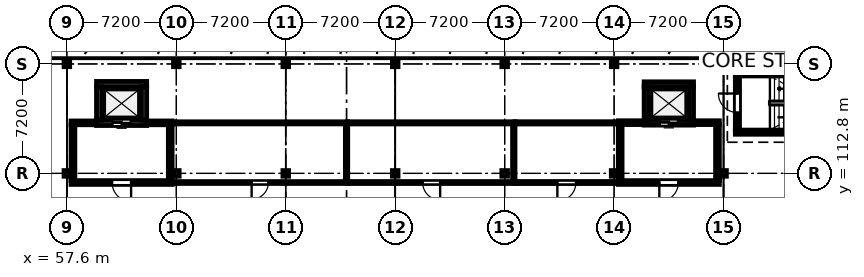
"""IFC4 building model, lengths in metres.
Left out: names, types, materials, properties, quantities, classifications, styles, units other than length and angle.
Written with IfcOpenShell. Run it as: python <this file> out.ifc"""

import sys

from ifc_helpers import new_model, si_unit, direction, frame, frame_2d, origin, origin_2d, place, context, subcontext, project, spatial, rectangle, i_section, extrude, element, fill, save


model = new_model("IFC4")
c1 = context("Model", 3, precision=1e-05, world=origin(), true_north=direction((0.0, 1.0)))
c2 = subcontext(c1, "Body", "Model", "MODEL_VIEW")
j1 = project(units=[si_unit("LENGTHUNIT", "METRE"), si_unit("PLANEANGLEUNIT", "RADIAN")], contexts=[c1])
p1 = place(None, origin())
s1 = spatial("IfcSite", under=j1, at=p1, CompositionType="ELEMENT")
p2 = place(p1, origin())
s2 = spatial("IfcBuilding", under=s1, at=p2, CompositionType="ELEMENT")
p3 = place(p2, frame((0.0, 0.0, 13.2)))
s3 = spatial("IfcBuildingStorey", under=s2, at=p3, CompositionType="ELEMENT", Elevation=13.2)
p4 = place(p3, frame((57.6, 112.8, 0.0), z_axis=(0.0, 0.0, 1.0), x_axis=(1.0, 0.0, 0.0)))
e1 = element("IfcColumn", 1, at=p4, inside=s3, PredefinedType="COLUMN", context=c2, shape_type="SweptSolid", body=[
    extrude(i_section(OverallWidth=0.373, OverallDepth=0.373, WebThickness=0.016, FlangeThickness=0.026, FilletRadius=0.015, at=origin_2d()), origin(), (0.0, 0.0, 1.0), 3.9),
])
p5 = place(p3, frame((57.6, 120.0, 0.0), z_axis=(0.0, 0.0, 1.0), x_axis=(1.0, 0.0, 0.0)))
e2 = element("IfcColumn", 2, at=p5, inside=s3, PredefinedType="COLUMN", context=c2, shape_type="SweptSolid", body=[
    extrude(i_section(OverallWidth=0.371, OverallDepth=0.363, WebThickness=0.013, FlangeThickness=0.022, FilletRadius=0.015, at=origin_2d()), origin(), (0.0, 0.0, 1.0), 3.9),
])
p6 = place(p3, frame((64.8, 112.8, 0.0), z_axis=(0.0, 0.0, 1.0), x_axis=(1.0, 0.0, 0.0)))
e3 = element("IfcColumn", 3, at=p6, inside=s3, PredefinedType="COLUMN", context=c2, shape_type="SweptSolid", body=[
    extrude(i_section(OverallWidth=0.373, OverallDepth=0.373, WebThickness=0.016, FlangeThickness=0.026, FilletRadius=0.015, at=origin_2d()), origin(), (0.0, 0.0, 1.0), 3.9),
])
p7 = place(p3, frame((64.8, 120.0, 0.0), z_axis=(0.0, 0.0, 1.0), x_axis=(1.0, 0.0, 0.0)))
e4 = element("IfcColumn", 4, at=p7, inside=s3, PredefinedType="COLUMN", context=c2, shape_type="SweptSolid", body=[
    extrude(i_section(OverallWidth=0.371, OverallDepth=0.363, WebThickness=0.013, FlangeThickness=0.022, FilletRadius=0.015, at=origin_2d()), origin(), (0.0, 0.0, 1.0), 3.9),
])
p8 = place(p3, frame((72.0, 112.8, 0.0), z_axis=(0.0, 0.0, 1.0), x_axis=(1.0, 0.0, 0.0)))
e5 = element("IfcColumn", 5, at=p8, inside=s3, PredefinedType="COLUMN", context=c2, shape_type="SweptSolid", body=[
    extrude(i_section(OverallWidth=0.373, OverallDepth=0.373, WebThickness=0.016, FlangeThickness=0.026, FilletRadius=0.015, at=origin_2d()), origin(), (0.0, 0.0, 1.0), 3.9),
])
p9 = place(p3, frame((72.0, 120.0, 0.0), z_axis=(0.0, 0.0, 1.0), x_axis=(1.0, 0.0, 0.0)))
e6 = element("IfcColumn", 6, at=p9, inside=s3, PredefinedType="COLUMN", context=c2, shape_type="SweptSolid", body=[
    extrude(i_section(OverallWidth=0.371, OverallDepth=0.363, WebThickness=0.013, FlangeThickness=0.022, FilletRadius=0.015, at=origin_2d()), origin(), (0.0, 0.0, 1.0), 3.9),
])
p10 = place(p3, frame((79.2, 112.8, 0.0), z_axis=(0.0, 0.0, 1.0), x_axis=(1.0, 0.0, 0.0)))
e7 = element("IfcColumn", 7, at=p10, inside=s3, PredefinedType="COLUMN", context=c2, shape_type="SweptSolid", body=[
    extrude(i_section(OverallWidth=0.373, OverallDepth=0.373, WebThickness=0.016, FlangeThickness=0.026, FilletRadius=0.015, at=origin_2d()), origin(), (0.0, 0.0, 1.0), 3.9),
])
p11 = place(p3, frame((79.2, 120.0, 0.0), z_axis=(0.0, 0.0, 1.0), x_axis=(1.0, 0.0, 0.0)))
e8 = element("IfcColumn", 8, at=p11, inside=s3, PredefinedType="COLUMN", context=c2, shape_type="SweptSolid", body=[
    extrude(i_section(OverallWidth=0.371, OverallDepth=0.363, WebThickness=0.013, FlangeThickness=0.022, FilletRadius=0.015, at=origin_2d()), origin(), (0.0, 0.0, 1.0), 3.9),
])
p12 = place(p3, frame((86.4, 112.8, 0.0), z_axis=(0.0, 0.0, 1.0), x_axis=(1.0, 0.0, 0.0)))
e9 = element("IfcColumn", 9, at=p12, inside=s3, PredefinedType="COLUMN", context=c2, shape_type="SweptSolid", body=[
    extrude(i_section(OverallWidth=0.373, OverallDepth=0.373, WebThickness=0.016, FlangeThickness=0.026, FilletRadius=0.015, at=origin_2d()), origin(), (0.0, 0.0, 1.0), 3.9),
])
p13 = place(p3, frame((86.4, 120.0, 0.0), z_axis=(0.0, 0.0, 1.0), x_axis=(1.0, 0.0, 0.0)))
e10 = element("IfcColumn", 10, at=p13, inside=s3, PredefinedType="COLUMN", context=c2, shape_type="SweptSolid", body=[
    extrude(i_section(OverallWidth=0.371, OverallDepth=0.363, WebThickness=0.013, FlangeThickness=0.022, FilletRadius=0.015, at=origin_2d()), origin(), (0.0, 0.0, 1.0), 3.9),
])
p14 = place(p3, frame((93.6, 112.8, 0.0), z_axis=(0.0, 0.0, 1.0), x_axis=(1.0, 0.0, 0.0)))
e11 = element("IfcColumn", 11, at=p14, inside=s3, PredefinedType="COLUMN", context=c2, shape_type="SweptSolid", body=[
    extrude(i_section(OverallWidth=0.373, OverallDepth=0.373, WebThickness=0.016, FlangeThickness=0.026, FilletRadius=0.015, at=origin_2d()), origin(), (0.0, 0.0, 1.0), 3.9),
])
p15 = place(p3, frame((93.6, 120.0, 0.0), z_axis=(0.0, 0.0, 1.0), x_axis=(1.0, 0.0, 0.0)))
e12 = element("IfcColumn", 12, at=p15, inside=s3, PredefinedType="COLUMN", context=c2, shape_type="SweptSolid", body=[
    extrude(i_section(OverallWidth=0.371, OverallDepth=0.363, WebThickness=0.013, FlangeThickness=0.022, FilletRadius=0.015, at=origin_2d()), origin(), (0.0, 0.0, 1.0), 3.9),
])
p16 = place(p3, frame((100.8, 112.8, 0.0), z_axis=(0.0, 0.0, 1.0), x_axis=(1.0, 0.0, 0.0)))
e13 = element("IfcColumn", 13, at=p16, inside=s3, PredefinedType="COLUMN", context=c2, shape_type="SweptSolid", body=[
    extrude(i_section(OverallWidth=0.373, OverallDepth=0.373, WebThickness=0.016, FlangeThickness=0.026, FilletRadius=0.015, at=origin_2d()), origin(), (0.0, 0.0, 1.0), 3.9),
])
p17 = place(p3, frame((100.8, 120.0, 0.0), z_axis=(0.0, 0.0, 1.0), x_axis=(1.0, 0.0, 0.0)))
e14 = element("IfcColumn", 14, at=p17, inside=s3, PredefinedType="COLUMN", context=c2, shape_type="SweptSolid", body=[
    extrude(i_section(OverallWidth=0.371, OverallDepth=0.363, WebThickness=0.013, FlangeThickness=0.022, FilletRadius=0.015, at=origin_2d()), origin(), (0.0, 0.0, 1.0), 3.9),
])
for number, where, z_axis, x_axis in (
    (15, (110.475, 115.512, 0.0), (0.0, 0.0, 1.0), (-1.0, 0.0, 0.0)),
    (16, (101.575, 119.348, 0.0), (0.0, 0.0, 1.0), (1.0, 0.0, 0.0)),
):
    element("IfcWall", number, at=place(p3, frame(where, z_axis=z_axis, x_axis=x_axis)), inside=s3, PredefinedType="SOLIDWALL", context=c2, shape_type="SweptSolid", body=[
        extrude(rectangle(XDim=8.9, YDim=0.275, at=frame_2d((4.45, 0.0))), origin(), (0.0, 0.0, 1.0), 3.66),
    ])
p18 = place(p3, frame((101.712, 115.65, 0.0), z_axis=(0.0, 0.0, 1.0), x_axis=(0.0, 1.0, 0.0)))
e17 = element("IfcWall", 17, at=p18, inside=s3, PredefinedType="SOLIDWALL", context=c2, shape_type="SweptSolid", body=[
    extrude(rectangle(XDim=3.56, YDim=0.275, at=frame_2d((1.78, 0.0))), origin(), (0.0, 0.0, 1.0), 3.66),
])
p19 = place(p18, frame((1.155, 0.0, 0.0)))
e18 = element("IfcOpeningElement", 18, at=p19, cuts=e17, PredefinedType="OPENING", context=c2, shape_type="SweptSolid", body=[
    extrude(rectangle(XDim=1.25, YDim=2.2, at=frame_2d((0.625, 1.1))), frame((0.0, 0.147, 0.0), z_axis=(0.0, -1.0, 0.0), x_axis=(1.0, 0.0, 0.0)), (0.0, 0.0, 1.0), 0.295),
])
p20 = place(p3, frame((62.85, 116.125, 0.0), z_axis=(0.0, 0.0, 1.0), x_axis=(-1.0, 0.0, 0.0)))
e19 = element("IfcWall", 19, at=p20, inside=s3, PredefinedType="SHEAR", context=c2, shape_type="SweptSolid", body=[
    extrude(rectangle(XDim=3.3, YDim=0.35, at=frame_2d((1.65, 0.0))), origin(), (0.0, 0.0, 1.0), 3.66),
])
p21 = place(p20, frame((1.05, 0.0, 0.0)))
e20 = element("IfcOpeningElement", 20, at=p21, cuts=e19, PredefinedType="OPENING", context=c2, shape_type="SweptSolid", body=[
    extrude(rectangle(XDim=1.2, YDim=2.2, at=frame_2d((0.6, 1.1))), frame((0.0, 0.185, 0.0), z_axis=(0.0, -1.0, 0.0), x_axis=(1.0, 0.0, 0.0)), (0.0, 0.0, 1.0), 0.37),
])
p22 = place(p3, frame((59.55, 118.675, 0.0), z_axis=(0.0, 0.0, 1.0), x_axis=(1.0, 0.0, 0.0)))
e21 = element("IfcWall", 21, at=p22, inside=s3, PredefinedType="SHEAR", context=c2, shape_type="SweptSolid", body=[
    extrude(rectangle(XDim=3.3, YDim=0.35, at=frame_2d((1.65, 0.0))), origin(), (0.0, 0.0, 1.0), 3.66),
])
for number, where, z_axis, x_axis in (
    (22, (59.725, 116.3, 0.0), (0.0, 0.0, 1.0), (0.0, 1.0, 0.0)),
    (23, (62.675, 118.5, 0.0), (0.0, 0.0, 1.0), (0.0, -1.0, 0.0)),
):
    element("IfcWall", number, at=place(p3, frame(where, z_axis=z_axis, x_axis=x_axis)), inside=s3, PredefinedType="SHEAR", context=c2, shape_type="SweptSolid", body=[
        extrude(rectangle(XDim=2.2, YDim=0.35, at=frame_2d((1.1, 0.0))), origin(), (0.0, 0.0, 1.0), 3.66),
    ])
p23 = place(p3, frame((98.825, 116.138, 0.0), z_axis=(0.0, 0.0, 1.0), x_axis=(-1.0, 0.0, 0.0)))
e24 = element("IfcWall", 24, at=p23, inside=s3, PredefinedType="SHEAR", context=c2, shape_type="SweptSolid", body=[
    extrude(rectangle(XDim=3.25, YDim=0.325, at=frame_2d((1.625, 0.0))), origin(), (0.0, 0.0, 1.0), 3.66),
])
p24 = place(p23, frame((1.025, 0.0, 0.0)))
e25 = element("IfcOpeningElement", 25, at=p24, cuts=e24, PredefinedType="OPENING", context=c2, shape_type="SweptSolid", body=[
    extrude(rectangle(XDim=1.2, YDim=2.2, at=frame_2d((0.6, 1.1))), frame((0.0, 0.172, 0.0), z_axis=(0.0, -1.0, 0.0), x_axis=(1.0, 0.0, 0.0)), (0.0, 0.0, 1.0), 0.345),
])
p25 = place(p3, frame((95.575, 118.662, 0.0), z_axis=(0.0, 0.0, 1.0), x_axis=(1.0, 0.0, 0.0)))
e26 = element("IfcWall", 26, at=p25, inside=s3, PredefinedType="SHEAR", context=c2, shape_type="SweptSolid", body=[
    extrude(rectangle(XDim=3.25, YDim=0.325, at=frame_2d((1.625, 0.0))), origin(), (0.0, 0.0, 1.0), 3.66),
])
for number, where, z_axis, x_axis in (
    (27, (95.738, 116.3, 0.0), (0.0, 0.0, 1.0), (0.0, 1.0, 0.0)),
    (28, (98.662, 118.5, 0.0), (0.0, 0.0, 1.0), (0.0, -1.0, 0.0)),
):
    element("IfcWall", number, at=place(p3, frame(where, z_axis=z_axis, x_axis=x_axis)), inside=s3, PredefinedType="SHEAR", context=c2, shape_type="SweptSolid", body=[
        extrude(rectangle(XDim=2.2, YDim=0.325, at=frame_2d((1.1, 0.0))), origin(), (0.0, 0.0, 1.0), 3.66),
    ])
p26 = place(p3, frame((64.525, 112.2, 0.0), z_axis=(0.0, 0.0, 1.0), x_axis=(-1.0, 0.0, 0.0)))
e29 = element("IfcWall", 29, at=p26, inside=s3, PredefinedType="PARTITIONING", context=c2, shape_type="SweptSolid", body=[
    extrude(rectangle(XDim=6.65, YDim=0.25, at=frame_2d((3.325, 0.0))), origin(), (0.0, 0.0, 1.0), 3.028),
])
p27 = place(p26, frame((2.7, 0.0, 0.0)))
e30 = element("IfcOpeningElement", 30, at=p27, cuts=e29, PredefinedType="OPENING", context=c2, shape_type="SweptSolid", body=[
    extrude(rectangle(XDim=1.25, YDim=2.2, at=frame_2d((0.625, 1.1))), frame((0.0, 0.135, 0.0), z_axis=(0.0, -1.0, 0.0), x_axis=(1.0, 0.0, 0.0)), (0.0, 0.0, 1.0), 0.27),
])
p28 = place(p3, frame((57.875, 116.125, 0.0), z_axis=(0.0, 0.0, 1.0), x_axis=(1.0, 0.0, 0.0)))
e31 = element("IfcWall", 31, at=p28, inside=s3, PredefinedType="PARTITIONING", context=c2, shape_type="SweptSolid", body=[
    extrude(rectangle(XDim=1.673, YDim=0.25, at=frame_2d((0.836, 0.0))), origin(), (0.0, 0.0, 1.0), 3.028),
])
p29 = place(p3, frame((62.852, 116.125, 0.0), z_axis=(0.0, 0.0, 1.0), x_axis=(1.0, 0.0, 0.0)))
e32 = element("IfcWall", 32, at=p29, inside=s3, PredefinedType="PARTITIONING", context=c2, shape_type="SweptSolid", body=[
    extrude(rectangle(XDim=1.673, YDim=0.25, at=frame_2d((0.836, 0.0))), origin(), (0.0, 0.0, 1.0), 3.028),
])
for number, where, z_axis, x_axis in (
    (33, (58.0, 112.327, 0.0), (0.0, 0.0, 1.0), (0.0, 1.0, 0.0)),
    (34, (64.4, 115.998, 0.0), (0.0, 0.0, 1.0), (0.0, -1.0, 0.0)),
):
    element("IfcWall", number, at=place(p3, frame(where, z_axis=z_axis, x_axis=x_axis)), inside=s3, PredefinedType="PARTITIONING", context=c2, shape_type="SweptSolid", body=[
        extrude(rectangle(XDim=3.671, YDim=0.25, at=frame_2d((1.835, 0.0))), origin(), (0.0, 0.0, 1.0), 3.028),
    ])
p30 = place(p3, frame((100.525, 112.2, 0.0), z_axis=(0.0, 0.0, 1.0), x_axis=(-1.0, 0.0, 0.0)))
e35 = element("IfcWall", 35, at=p30, inside=s3, PredefinedType="PARTITIONING", context=c2, shape_type="SweptSolid", body=[
    extrude(rectangle(XDim=6.65, YDim=0.25, at=frame_2d((3.325, 0.0))), origin(), (0.0, 0.0, 1.0), 3.028),
])
p31 = place(p30, frame((2.7, 0.0, 0.0)))
e36 = element("IfcOpeningElement", 36, at=p31, cuts=e35, PredefinedType="OPENING", context=c2, shape_type="SweptSolid", body=[
    extrude(rectangle(XDim=1.25, YDim=2.2, at=frame_2d((0.625, 1.1))), frame((0.0, 0.135, 0.0), z_axis=(0.0, -1.0, 0.0), x_axis=(1.0, 0.0, 0.0)), (0.0, 0.0, 1.0), 0.27),
])
for number, where, z_axis, x_axis in (
    (37, (93.875, 116.138, 0.0), (0.0, 0.0, 1.0), (1.0, 0.0, 0.0)),
    (38, (98.827, 116.138, 0.0), (0.0, 0.0, 1.0), (1.0, 0.0, 0.0)),
):
    element("IfcWall", number, at=place(p3, frame(where, z_axis=z_axis, x_axis=x_axis)), inside=s3, PredefinedType="PARTITIONING", context=c2, shape_type="SweptSolid", body=[
        extrude(rectangle(XDim=1.698, YDim=0.25, at=frame_2d((0.849, 0.0))), origin(), (0.0, 0.0, 1.0), 3.028),
    ])
for number, where, z_axis, x_axis in (
    (39, (94.0, 112.327, 0.0), (0.0, 0.0, 1.0), (0.0, 1.0, 0.0)),
    (40, (100.4, 116.011, 0.0), (0.0, 0.0, 1.0), (0.0, -1.0, 0.0)),
):
    element("IfcWall", number, at=place(p3, frame(where, z_axis=z_axis, x_axis=x_axis)), inside=s3, PredefinedType="PARTITIONING", context=c2, shape_type="SweptSolid", body=[
        extrude(rectangle(XDim=3.684, YDim=0.25, at=frame_2d((1.842, 0.0))), origin(), (0.0, 0.0, 1.0), 3.028),
    ])
p32 = place(p3, frame((76.08, 112.2, 0.0), z_axis=(0.0, 0.0, 1.0), x_axis=(-1.0, 0.0, 0.0)))
e41 = element("IfcWall", 41, at=p32, inside=s3, PredefinedType="PARTITIONING", context=c2, shape_type="SweptSolid", body=[
    extrude(rectangle(XDim=11.553, YDim=0.125, at=frame_2d((5.776, 0.0))), origin(), (0.0, 0.0, 1.0), 3.028),
])
p33 = place(p32, frame((5.226, 0.0, 0.0)))
e42 = element("IfcOpeningElement", 42, at=p33, cuts=e41, PredefinedType="OPENING", context=c2, shape_type="SweptSolid", body=[
    extrude(rectangle(XDim=1.1, YDim=2.1, at=frame_2d((0.55, 1.05))), frame((0.0, 0.073, 0.0), z_axis=(0.0, -1.0, 0.0), x_axis=(1.0, 0.0, 0.0)), (0.0, 0.0, 1.0), 0.145),
])
p34 = place(p3, frame((87.08, 112.2, 0.0), z_axis=(0.0, 0.0, 1.0), x_axis=(-1.0, 0.0, 0.0)))
e43 = element("IfcWall", 43, at=p34, inside=s3, PredefinedType="PARTITIONING", context=c2, shape_type="SweptSolid", body=[
    extrude(rectangle(XDim=10.998, YDim=0.13, at=frame_2d((5.499, 0.0))), origin(), (0.0, 0.0, 1.0), 3.028),
])
p35 = place(p34, frame((4.924, 0.0, 0.0)))
e44 = element("IfcOpeningElement", 44, at=p35, cuts=e43, PredefinedType="OPENING", context=c2, shape_type="SweptSolid", body=[
    extrude(rectangle(XDim=1.15, YDim=2.1, at=frame_2d((0.575, 1.05))), frame((0.0, 0.075, 0.0), z_axis=(0.0, -1.0, 0.0), x_axis=(1.0, 0.0, 0.0)), (0.0, 0.0, 1.0), 0.15),
])
p36 = place(p34, frame((2.074, 0.0, 0.95)))
e45 = element("IfcOpeningElement", 45, at=p36, cuts=e43, PredefinedType="OPENING", context=c2, shape_type="SweptSolid", body=[
    extrude(rectangle(XDim=1.6, YDim=1.0, at=frame_2d((0.8, 0.5))), frame((0.0, 0.075, 0.0), z_axis=(0.0, -1.0, 0.0), x_axis=(1.0, 0.0, 0.0)), (0.0, 0.0, 1.0), 0.15),
])
p37 = place(p3, frame((93.873, 112.2, 0.0), z_axis=(0.0, 0.0, 1.0), x_axis=(-1.0, 0.0, 0.0)))
e46 = element("IfcWall", 46, at=p37, inside=s3, PredefinedType="PARTITIONING", context=c2, shape_type="SweptSolid", body=[
    extrude(rectangle(XDim=6.791, YDim=0.135, at=frame_2d((3.396, 0.0))), origin(), (0.0, 0.0, 1.0), 3.028),
])
p38 = place(p37, frame((2.786, 0.0, 0.0)))
e47 = element("IfcOpeningElement", 47, at=p38, cuts=e46, PredefinedType="OPENING", context=c2, shape_type="SweptSolid", body=[
    extrude(rectangle(XDim=1.22, YDim=2.1, at=frame_2d((0.61, 1.05))), frame((0.0, 0.077, 0.0), z_axis=(0.0, -1.0, 0.0), x_axis=(1.0, 0.0, 0.0)), (0.0, 0.0, 1.0), 0.155),
])
p39 = place(p3, frame((64.527, 116.125, 0.0), z_axis=(0.0, 0.0, 1.0), x_axis=(1.0, 0.0, 0.0)))
e48 = element("IfcWall", 48, at=p39, inside=s3, PredefinedType="PARTITIONING", context=c2, shape_type="SweptSolid", body=[
    extrude(rectangle(XDim=11.553, YDim=0.14, at=frame_2d((5.776, 0.0))), origin(), (0.0, 0.0, 1.0), 3.028),
])
p40 = place(p3, frame((76.082, 116.125, 0.0), z_axis=(0.0, 0.0, 1.0), x_axis=(1.0, 0.0, 0.0)))
e49 = element("IfcWall", 49, at=p40, inside=s3, PredefinedType="PARTITIONING", context=c2, shape_type="SweptSolid", body=[
    extrude(rectangle(XDim=10.998, YDim=0.145, at=frame_2d((5.499, 0.0))), origin(), (0.0, 0.0, 1.0), 3.028),
])
p41 = place(p3, frame((87.082, 116.125, 0.0), z_axis=(0.0, 0.0, 1.0), x_axis=(1.0, 0.0, 0.0)))
e50 = element("IfcWall", 50, at=p41, inside=s3, PredefinedType="PARTITIONING", context=c2, shape_type="SweptSolid", body=[
    extrude(rectangle(XDim=6.791, YDim=0.15, at=frame_2d((3.396, 0.0))), origin(), (0.0, 0.0, 1.0), 3.028),
])
p42 = place(p3, frame((76.0, 116.05, 0.0), z_axis=(0.0, 0.0, 1.0), x_axis=(0.0, -1.0, 0.0)))
e51 = element("IfcWall", 51, at=p42, inside=s3, PredefinedType="PARTITIONING", context=c2, shape_type="SweptSolid", body=[
    extrude(rectangle(XDim=3.783, YDim=0.155, at=frame_2d((1.892, 0.0))), origin(), (0.0, 0.0, 1.0), 3.028),
])
p43 = place(p3, frame((87.0, 116.048, 0.0), z_axis=(0.0, 0.0, 1.0), x_axis=(0.0, -1.0, 0.0)))
e52 = element("IfcWall", 52, at=p43, inside=s3, PredefinedType="PARTITIONING", context=c2, shape_type="SweptSolid", body=[
    extrude(rectangle(XDim=3.778, YDim=0.16, at=frame_2d((1.889, 0.0))), origin(), (0.0, 0.0, 1.0), 3.028),
])
p44 = place(p19, origin())
e53 = element("IfcDoor", 53, at=p44, inside=s3, OperationType="SINGLE_SWING_RIGHT", PredefinedType="DOOR", context=c2, shape_type="SweptSolid", body=[
    extrude(rectangle(XDim=1.25, YDim=2.2, at=frame_2d((0.625, 1.1))), frame((0.0, 0.025, 0.0), z_axis=(0.0, -1.0, 0.0), x_axis=(1.0, 0.0, 0.0)), (0.0, 0.0, 1.0), 0.05),
])
fill(e18, e53)
p45 = place(p21, origin())
e54 = element("IfcDoor", 54, at=p45, inside=s3, OperationType="DOUBLE_DOOR_SLIDING", PredefinedType="DOOR", context=c2, shape_type="SweptSolid", body=[
    extrude(rectangle(XDim=1.2, YDim=2.2, at=frame_2d((0.6, 1.1))), frame((0.0, 0.025, 0.0), z_axis=(0.0, -1.0, 0.0), x_axis=(1.0, 0.0, 0.0)), (0.0, 0.0, 1.0), 0.05),
])
fill(e20, e54)
p46 = place(p24, origin())
e55 = element("IfcDoor", 55, at=p46, inside=s3, OperationType="DOUBLE_DOOR_SLIDING", PredefinedType="DOOR", context=c2, shape_type="SweptSolid", body=[
    extrude(rectangle(XDim=1.2, YDim=2.2, at=frame_2d((0.6, 1.1))), frame((0.0, 0.025, 0.0), z_axis=(0.0, -1.0, 0.0), x_axis=(1.0, 0.0, 0.0)), (0.0, 0.0, 1.0), 0.05),
])
fill(e25, e55)
p47 = place(p27, origin())
e56 = element("IfcDoor", 56, at=p47, inside=s3, OperationType="SINGLE_SWING_LEFT", PredefinedType="DOOR", context=c2, shape_type="SweptSolid", body=[
    extrude(rectangle(XDim=1.25, YDim=2.2, at=frame_2d((0.625, 1.1))), frame((0.0, 0.025, 0.0), z_axis=(0.0, -1.0, 0.0), x_axis=(1.0, 0.0, 0.0)), (0.0, 0.0, 1.0), 0.05),
])
fill(e30, e56)
p48 = place(p31, origin())
e57 = element("IfcDoor", 57, at=p48, inside=s3, OperationType="SINGLE_SWING_RIGHT", PredefinedType="DOOR", context=c2, shape_type="SweptSolid", body=[
    extrude(rectangle(XDim=1.25, YDim=2.2, at=frame_2d((0.625, 1.1))), frame((0.0, 0.025, 0.0), z_axis=(0.0, -1.0, 0.0), x_axis=(1.0, 0.0, 0.0)), (0.0, 0.0, 1.0), 0.05),
])
fill(e36, e57)
p49 = place(p33, origin())
e58 = element("IfcDoor", 58, at=p49, inside=s3, OperationType="SINGLE_SWING_RIGHT", PredefinedType="DOOR", context=c2, shape_type="SweptSolid", body=[
    extrude(rectangle(XDim=1.1, YDim=2.1, at=frame_2d((0.55, 1.05))), frame((0.0, 0.025, 0.0), z_axis=(0.0, -1.0, 0.0), x_axis=(1.0, 0.0, 0.0)), (0.0, 0.0, 1.0), 0.05),
])
fill(e42, e58)
p50 = place(p35, origin())
e59 = element("IfcDoor", 59, at=p50, inside=s3, OperationType="SINGLE_SWING_LEFT", PredefinedType="DOOR", context=c2, shape_type="SweptSolid", body=[
    extrude(rectangle(XDim=1.15, YDim=2.1, at=frame_2d((0.575, 1.05))), frame((0.0, 0.025, 0.0), z_axis=(0.0, -1.0, 0.0), x_axis=(1.0, 0.0, 0.0)), (0.0, 0.0, 1.0), 0.05),
])
fill(e44, e59)
p51 = place(p36, origin())
e60 = element("IfcWindow", 60, at=p51, inside=s3, PartitioningType="SINGLE_PANEL", PredefinedType="WINDOW", context=c2, shape_type="SweptSolid", body=[
    extrude(rectangle(XDim=1.6, YDim=1.0, at=frame_2d((0.8, 0.5))), frame((0.0, 0.03, 0.0), z_axis=(0.0, -1.0, 0.0), x_axis=(1.0, 0.0, 0.0)), (0.0, 0.0, 1.0), 0.06),
])
fill(e45, e60)
p52 = place(p38, origin())
e61 = element("IfcDoor", 61, at=p52, inside=s3, OperationType="SINGLE_SWING_RIGHT", PredefinedType="DOOR", context=c2, shape_type="SweptSolid", body=[
    extrude(rectangle(XDim=1.22, YDim=2.1, at=frame_2d((0.61, 1.05))), frame((0.0, 0.025, 0.0), z_axis=(0.0, -1.0, 0.0), x_axis=(1.0, 0.0, 0.0)), (0.0, 0.0, 1.0), 0.05),
])
fill(e47, e61)
save(model, sys.argv[1])
